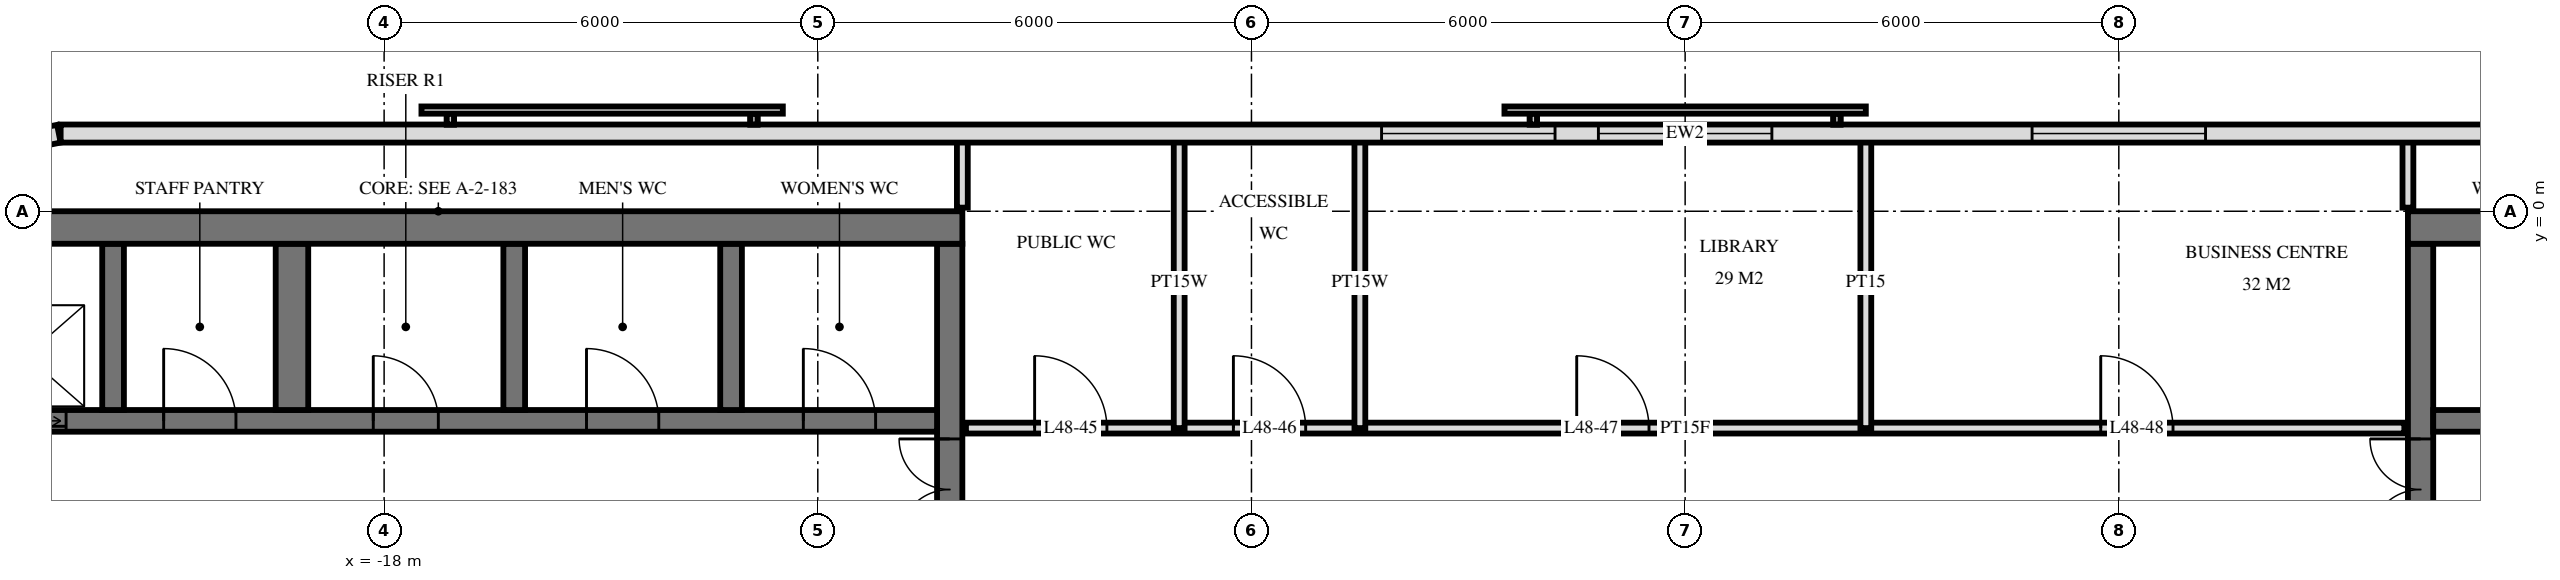
"""IFC4 building model, lengths in metres.
Left out: names, types, materials, properties, quantities, classifications, styles, units other than length and angle.
Written with IfcOpenShell. Run it as: python <this file> out.ifc"""

import sys

from ifc_helpers import new_model, si_unit, direction, frame, frame_2d, origin, place, context, subcontext, project, spatial, rectangle, extrude, element, fill, save


model = new_model("IFC4")
c1 = context("Model", 3, precision=1e-05, world=origin(), true_north=direction((0.0, 1.0)))
c2 = subcontext(c1, "Body", "Model", "MODEL_VIEW")
j1 = project(units=[si_unit("LENGTHUNIT", "METRE"), si_unit("PLANEANGLEUNIT", "RADIAN")], contexts=[c1])
p1 = place(None, origin())
s1 = spatial("IfcSite", under=j1, at=p1, CompositionType="ELEMENT")
p2 = place(p1, origin())
s2 = spatial("IfcBuilding", under=s1, at=p2, CompositionType="ELEMENT")
p3 = place(p2, frame((0.0, 0.0, 187.1)))
s3 = spatial("IfcBuildingStorey", under=s2, at=p3, CompositionType="ELEMENT", Elevation=187.1)
p4 = place(p3, frame((-24.5, -0.225, 0.0), z_axis=(0.0, 0.0, 1.0), x_axis=(1.0, 0.0, 0.0)))
e1 = element("IfcWall", 1, at=p4, inside=s3, PredefinedType="SHEAR", context=c2, shape_type="SweptSolid", body=[
    extrude(rectangle(XDim=14.5, YDim=0.45, at=frame_2d((7.25, 0.0))), origin(), (0.0, 0.0, 1.0), 3.5),
])
p5 = place(p3, frame((-10.175, -14.55, 0.0), z_axis=(0.0, 0.0, 1.0), x_axis=(0.0, 1.0, 0.0)))
e2 = element("IfcWall", 2, at=p5, inside=s3, PredefinedType="SHEAR", context=c2, shape_type="SweptSolid", body=[
    extrude(rectangle(XDim=14.1, YDim=0.35, at=frame_2d((7.05, 0.0))), origin(), (0.0, 0.0, 1.0), 3.5),
])
p6 = place(p5, frame((8.4, 0.0, 0.0)))
e3 = element("IfcOpeningElement", 3, at=p6, cuts=e2, PredefinedType="OPENING", context=c2, shape_type="SweptSolid", body=[
    extrude(rectangle(XDim=1.4, YDim=2.4, at=frame_2d((0.7, 1.2))), frame((0.0, 0.185, 0.0), z_axis=(0.0, -1.0, 0.0), x_axis=(1.0, 0.0, 0.0)), (0.0, 0.0, 1.0), 0.37),
])
p7 = place(p5, frame((10.0, 0.0, 0.0)))
e4 = element("IfcOpeningElement", 4, at=p7, cuts=e2, PredefinedType="OPENING", context=c2, shape_type="SweptSolid", body=[
    extrude(rectangle(XDim=1.4, YDim=2.4, at=frame_2d((0.7, 1.2))), frame((0.0, 0.185, 0.0), z_axis=(0.0, -1.0, 0.0), x_axis=(1.0, 0.0, 0.0)), (0.0, 0.0, 1.0), 0.37),
])
p8 = place(p5, frame((4.0, 0.0, 0.0)))
e5 = element("IfcOpeningElement", 5, at=p8, cuts=e2, PredefinedType="OPENING", context=c2, shape_type="SweptSolid", body=[
    extrude(rectangle(XDim=1.2, YDim=2.1, at=frame_2d((0.6, 1.05))), frame((0.0, 0.185, 0.0), z_axis=(0.0, -1.0, 0.0), x_axis=(1.0, 0.0, 0.0)), (0.0, 0.0, 1.0), 0.37),
])
p9 = place(p3, frame((-24.05, -2.9, 0.0), z_axis=(0.0, 0.0, 1.0), x_axis=(1.0, 0.0, 0.0)))
e6 = element("IfcWall", 6, at=p9, inside=s3, PredefinedType="SHEAR", context=c2, shape_type="SweptSolid", body=[
    extrude(rectangle(XDim=13.7, YDim=0.3, at=frame_2d((6.85, 0.0))), origin(), (0.0, 0.0, 1.0), 3.5),
])
p10 = place(p9, frame((0.55, 0.0, 0.0)))
e7 = element("IfcOpeningElement", 7, at=p10, cuts=e6, PredefinedType="OPENING", context=c2, shape_type="SweptSolid", body=[
    extrude(rectangle(XDim=1.1, YDim=2.1, at=frame_2d((0.55, 1.05))), frame((0.0, 0.16, 0.0), z_axis=(0.0, -1.0, 0.0), x_axis=(1.0, 0.0, 0.0)), (0.0, 0.0, 1.0), 0.32),
])
p11 = place(p9, frame((5.9, 0.0, 0.0)))
e8 = element("IfcOpeningElement", 8, at=p11, cuts=e6, PredefinedType="OPENING", context=c2, shape_type="SweptSolid", body=[
    extrude(rectangle(XDim=0.9, YDim=2.1, at=frame_2d((0.45, 1.05))), frame((0.0, 0.16, 0.0), z_axis=(0.0, -1.0, 0.0), x_axis=(1.0, 0.0, 0.0)), (0.0, 0.0, 1.0), 0.32),
])
p12 = place(p9, frame((11.85, 0.0, 0.0)))
e9 = element("IfcOpeningElement", 9, at=p12, cuts=e6, PredefinedType="OPENING", context=c2, shape_type="SweptSolid", body=[
    extrude(rectangle(XDim=1.0, YDim=2.1, at=frame_2d((0.5, 1.05))), frame((0.0, 0.16, 0.0), z_axis=(0.0, -1.0, 0.0), x_axis=(1.0, 0.0, 0.0)), (0.0, 0.0, 1.0), 0.32),
])
p13 = place(p9, frame((8.85, 0.0, 0.0)))
e10 = element("IfcOpeningElement", 10, at=p13, cuts=e6, PredefinedType="OPENING", context=c2, shape_type="SweptSolid", body=[
    extrude(rectangle(XDim=1.0, YDim=2.1, at=frame_2d((0.5, 1.05))), frame((0.0, 0.16, 0.0), z_axis=(0.0, -1.0, 0.0), x_axis=(1.0, 0.0, 0.0)), (0.0, 0.0, 1.0), 0.32),
])
p14 = place(p9, frame((3.0, 0.0, 0.0)))
e11 = element("IfcOpeningElement", 11, at=p14, cuts=e6, PredefinedType="OPENING", context=c2, shape_type="SweptSolid", body=[
    extrude(rectangle(XDim=1.0, YDim=2.1, at=frame_2d((0.5, 1.05))), frame((0.0, 0.16, 0.0), z_axis=(0.0, -1.0, 0.0), x_axis=(1.0, 0.0, 0.0)), (0.0, 0.0, 1.0), 0.32),
])
for number, where, z_axis, x_axis in (
    (12, (-13.2, -2.75, 0.0), (0.0, 0.0, 1.0), (0.0, 1.0, 0.0)),
    (13, (-16.2, -2.75, 0.0), (0.0, 0.0, 1.0), (0.0, 1.0, 0.0)),
):
    element("IfcWall", number, at=place(p3, frame(where, z_axis=z_axis, x_axis=x_axis)), inside=s3, PredefinedType="SHEAR", context=c2, shape_type="SweptSolid", body=[
        extrude(rectangle(XDim=2.3, YDim=0.3, at=frame_2d((1.15, 0.0))), origin(), (0.0, 0.0, 1.0), 3.5),
    ])
p15 = place(p3, frame((-19.275, -2.75, 0.0), z_axis=(0.0, 0.0, 1.0), x_axis=(0.0, 1.0, 0.0)))
e14 = element("IfcWall", 14, at=p15, inside=s3, PredefinedType="SHEAR", context=c2, shape_type="SweptSolid", body=[
    extrude(rectangle(XDim=2.3, YDim=0.45, at=frame_2d((1.15, 0.0))), origin(), (0.0, 0.0, 1.0), 3.5),
])
p16 = place(p3, frame((-21.75, -2.75, 0.0), z_axis=(0.0, 0.0, 1.0), x_axis=(0.0, 1.0, 0.0)))
e15 = element("IfcWall", 15, at=p16, inside=s3, PredefinedType="SHEAR", context=c2, shape_type="SweptSolid", body=[
    extrude(rectangle(XDim=2.3, YDim=0.3, at=frame_2d((1.15, 0.0))), origin(), (0.0, 0.0, 1.0), 3.5),
])
p17 = place(p3, frame((10.0, -0.225, 0.0), z_axis=(0.0, 0.0, 1.0), x_axis=(1.0, 0.0, 0.0)))
e16 = element("IfcWall", 16, at=p17, inside=s3, PredefinedType="SHEAR", context=c2, shape_type="SweptSolid", body=[
    extrude(rectangle(XDim=14.5, YDim=0.45, at=frame_2d((7.25, 0.0))), origin(), (0.0, 0.0, 1.0), 3.5),
])
p18 = place(p3, frame((10.175, -14.55, 0.0), z_axis=(0.0, 0.0, 1.0), x_axis=(0.0, 1.0, 0.0)))
e17 = element("IfcWall", 17, at=p18, inside=s3, PredefinedType="SHEAR", context=c2, shape_type="SweptSolid", body=[
    extrude(rectangle(XDim=14.1, YDim=0.35, at=frame_2d((7.05, 0.0))), origin(), (0.0, 0.0, 1.0), 3.5),
])
p19 = place(p18, frame((8.4, 0.0, 0.0)))
e18 = element("IfcOpeningElement", 18, at=p19, cuts=e17, PredefinedType="OPENING", context=c2, shape_type="SweptSolid", body=[
    extrude(rectangle(XDim=1.4, YDim=2.4, at=frame_2d((0.7, 1.2))), frame((0.0, 0.185, 0.0), z_axis=(0.0, -1.0, 0.0), x_axis=(1.0, 0.0, 0.0)), (0.0, 0.0, 1.0), 0.37),
])
p20 = place(p18, frame((10.0, 0.0, 0.0)))
e19 = element("IfcOpeningElement", 19, at=p20, cuts=e17, PredefinedType="OPENING", context=c2, shape_type="SweptSolid", body=[
    extrude(rectangle(XDim=1.4, YDim=2.4, at=frame_2d((0.7, 1.2))), frame((0.0, 0.185, 0.0), z_axis=(0.0, -1.0, 0.0), x_axis=(1.0, 0.0, 0.0)), (0.0, 0.0, 1.0), 0.37),
])
p21 = place(p18, frame((4.0, 0.0, 0.0)))
e20 = element("IfcOpeningElement", 20, at=p21, cuts=e17, PredefinedType="OPENING", context=c2, shape_type="SweptSolid", body=[
    extrude(rectangle(XDim=1.2, YDim=2.1, at=frame_2d((0.6, 1.05))), frame((0.0, 0.185, 0.0), z_axis=(0.0, -1.0, 0.0), x_axis=(1.0, 0.0, 0.0)), (0.0, 0.0, 1.0), 0.37),
])
p22 = place(p3, frame((10.35, -2.9, 0.0), z_axis=(0.0, 0.0, 1.0), x_axis=(1.0, 0.0, 0.0)))
e21 = element("IfcWall", 21, at=p22, inside=s3, PredefinedType="SHEAR", context=c2, shape_type="SweptSolid", body=[
    extrude(rectangle(XDim=13.7, YDim=0.3, at=frame_2d((6.85, 0.0))), origin(), (0.0, 0.0, 1.0), 3.5),
])
p23 = place(p22, frame((12.05, 0.0, 0.0)))
e22 = element("IfcOpeningElement", 22, at=p23, cuts=e21, PredefinedType="OPENING", context=c2, shape_type="SweptSolid", body=[
    extrude(rectangle(XDim=1.1, YDim=2.1, at=frame_2d((0.55, 1.05))), frame((0.0, 0.16, 0.0), z_axis=(0.0, -1.0, 0.0), x_axis=(1.0, 0.0, 0.0)), (0.0, 0.0, 1.0), 0.32),
])
p24 = place(p22, frame((6.9, 0.0, 0.0)))
e23 = element("IfcOpeningElement", 23, at=p24, cuts=e21, PredefinedType="OPENING", context=c2, shape_type="SweptSolid", body=[
    extrude(rectangle(XDim=0.9, YDim=2.1, at=frame_2d((0.45, 1.05))), frame((0.0, 0.16, 0.0), z_axis=(0.0, -1.0, 0.0), x_axis=(1.0, 0.0, 0.0)), (0.0, 0.0, 1.0), 0.32),
])
p25 = place(p22, frame((0.85, 0.0, 0.0)))
e24 = element("IfcOpeningElement", 24, at=p25, cuts=e21, PredefinedType="OPENING", context=c2, shape_type="SweptSolid", body=[
    extrude(rectangle(XDim=1.0, YDim=2.1, at=frame_2d((0.5, 1.05))), frame((0.0, 0.16, 0.0), z_axis=(0.0, -1.0, 0.0), x_axis=(1.0, 0.0, 0.0)), (0.0, 0.0, 1.0), 0.32),
])
p26 = place(p22, frame((3.85, 0.0, 0.0)))
e25 = element("IfcOpeningElement", 25, at=p26, cuts=e21, PredefinedType="OPENING", context=c2, shape_type="SweptSolid", body=[
    extrude(rectangle(XDim=1.0, YDim=2.1, at=frame_2d((0.5, 1.05))), frame((0.0, 0.16, 0.0), z_axis=(0.0, -1.0, 0.0), x_axis=(1.0, 0.0, 0.0)), (0.0, 0.0, 1.0), 0.32),
])
p27 = place(p22, frame((9.7, 0.0, 0.0)))
e26 = element("IfcOpeningElement", 26, at=p27, cuts=e21, PredefinedType="OPENING", context=c2, shape_type="SweptSolid", body=[
    extrude(rectangle(XDim=1.0, YDim=2.1, at=frame_2d((0.5, 1.05))), frame((0.0, 0.16, 0.0), z_axis=(0.0, -1.0, 0.0), x_axis=(1.0, 0.0, 0.0)), (0.0, 0.0, 1.0), 0.32),
])
p28 = place(p3, frame((22.475, 1.075, 0.0), z_axis=(0.0, 0.0, 1.0), x_axis=(-1.0, 0.0, 0.0)))
e27 = element("IfcWall", 27, at=p28, inside=s3, PredefinedType="SOLIDWALL", context=c2, shape_type="SweptSolid", body=[
    extrude(rectangle(XDim=44.951, YDim=0.25, at=frame_2d((22.475, 0.0))), origin(), (0.0, 0.0, 1.0), 3.22),
])
p29 = place(p28, frame((15.275, 0.0, 0.9)))
e28 = element("IfcOpeningElement", 28, at=p29, cuts=e27, PredefinedType="OPENING", context=c2, shape_type="SweptSolid", body=[
    extrude(rectangle(XDim=2.4, YDim=1.5, at=frame_2d((1.2, 0.75))), frame((0.0, 0.135, 0.0), z_axis=(0.0, -1.0, 0.0), x_axis=(1.0, 0.0, 0.0)), (0.0, 0.0, 1.0), 0.27),
])
p30 = place(p28, frame((21.275, 0.0, 0.9)))
e29 = element("IfcOpeningElement", 29, at=p30, cuts=e27, PredefinedType="OPENING", context=c2, shape_type="SweptSolid", body=[
    extrude(rectangle(XDim=2.4, YDim=1.5, at=frame_2d((1.2, 0.75))), frame((0.0, 0.135, 0.0), z_axis=(0.0, -1.0, 0.0), x_axis=(1.0, 0.0, 0.0)), (0.0, 0.0, 1.0), 0.27),
])
p31 = place(p28, frame((24.275, 0.0, 0.9)))
e30 = element("IfcOpeningElement", 30, at=p31, cuts=e27, PredefinedType="OPENING", context=c2, shape_type="SweptSolid", body=[
    extrude(rectangle(XDim=2.4, YDim=1.5, at=frame_2d((1.2, 0.75))), frame((0.0, 0.135, 0.0), z_axis=(0.0, -1.0, 0.0), x_axis=(1.0, 0.0, 0.0)), (0.0, 0.0, 1.0), 0.27),
])
p32 = place(p3, frame((-22.5, 1.073, 0.0), z_axis=(0.0, 0.0, 1.0), x_axis=(-0.980803419081, -0.194999110559, 0.0)))
e31 = element("IfcWall", 31, at=p32, inside=s3, PredefinedType="SOLIDWALL", context=c2, shape_type="SweptSolid", body=[
    extrude(rectangle(XDim=1.681, YDim=0.25, at=frame_2d((0.841, 0.0))), origin(), (0.0, 0.0, 1.0), 3.22),
])
p33 = place(p3, frame((10.0, 0.05, 0.0), z_axis=(0.0, 0.0, 1.0), x_axis=(0.0, 1.0, 0.0)))
e32 = element("IfcWall", 32, at=p33, inside=s3, PredefinedType="PARTITIONING", context=c2, shape_type="SweptSolid", body=[
    extrude(rectangle(XDim=0.97, YDim=0.15, at=frame_2d((0.485, 0.0))), origin(), (0.0, 0.0, 1.0), 3.22),
])
p34 = place(p3, frame((2.5, -3.0, 0.0), z_axis=(0.0, 0.0, 1.0), x_axis=(0.0, 1.0, 0.0)))
e33 = element("IfcWall", 33, at=p34, inside=s3, PredefinedType="PARTITIONING", context=c2, shape_type="SweptSolid", body=[
    extrude(rectangle(XDim=4.02, YDim=0.15, at=frame_2d((2.01, 0.0))), origin(), (0.0, 0.0, 1.0), 3.22),
])
for number, where, z_axis, x_axis in (
    (34, (-4.5, -3.0, 0.0), (0.0, 0.0, 1.0), (0.0, 1.0, 0.0)),
    (35, (-7.0, -3.0, 0.0), (0.0, 0.0, 1.0), (0.0, 1.0, 0.0)),
):
    element("IfcWall", number, at=place(p3, frame(where, z_axis=z_axis, x_axis=x_axis)), inside=s3, PredefinedType="PLUMBINGWALL", context=c2, shape_type="SweptSolid", body=[
        extrude(rectangle(XDim=4.02, YDim=0.15, at=frame_2d((2.01, 0.0))), origin(), (0.0, 0.0, 1.0), 3.22),
    ])
p35 = place(p3, frame((-10.0, 0.05, 0.0), z_axis=(0.0, 0.0, 1.0), x_axis=(0.0, 1.0, 0.0)))
e36 = element("IfcWall", 36, at=p35, inside=s3, PredefinedType="PLUMBINGWALL", context=c2, shape_type="SweptSolid", body=[
    extrude(rectangle(XDim=0.97, YDim=0.15, at=frame_2d((0.485, 0.0))), origin(), (0.0, 0.0, 1.0), 3.22),
])
p36 = place(p3, frame((-9.95, -3.0, 0.0), z_axis=(0.0, 0.0, 1.0), x_axis=(1.0, 0.0, 0.0)))
e37 = element("IfcWall", 37, at=p36, inside=s3, PredefinedType="PARTITIONING", context=c2, shape_type="SweptSolid", body=[
    extrude(rectangle(XDim=19.9, YDim=0.15, at=frame_2d((9.95, 0.0))), origin(), (0.0, 0.0, 1.0), 3.22),
])
p37 = place(p36, frame((0.95, 0.0, 0.0)))
e38 = element("IfcOpeningElement", 38, at=p37, cuts=e37, PredefinedType="OPENING", context=c2, shape_type="SweptSolid", body=[
    extrude(rectangle(XDim=1.0, YDim=2.1, at=frame_2d((0.5, 1.05))), frame((0.0, 0.085, 0.0), z_axis=(0.0, -1.0, 0.0), x_axis=(1.0, 0.0, 0.0)), (0.0, 0.0, 1.0), 0.17),
])
p38 = place(p36, frame((3.7, 0.0, 0.0)))
e39 = element("IfcOpeningElement", 39, at=p38, cuts=e37, PredefinedType="OPENING", context=c2, shape_type="SweptSolid", body=[
    extrude(rectangle(XDim=1.0, YDim=2.1, at=frame_2d((0.5, 1.05))), frame((0.0, 0.085, 0.0), z_axis=(0.0, -1.0, 0.0), x_axis=(1.0, 0.0, 0.0)), (0.0, 0.0, 1.0), 0.17),
])
p39 = place(p36, frame((8.45, 0.0, 0.0)))
e40 = element("IfcOpeningElement", 40, at=p39, cuts=e37, PredefinedType="OPENING", context=c2, shape_type="SweptSolid", body=[
    extrude(rectangle(XDim=1.0, YDim=2.1, at=frame_2d((0.5, 1.05))), frame((0.0, 0.085, 0.0), z_axis=(0.0, -1.0, 0.0), x_axis=(1.0, 0.0, 0.0)), (0.0, 0.0, 1.0), 0.17),
])
p40 = place(p36, frame((15.7, 0.0, 0.0)))
e41 = element("IfcOpeningElement", 41, at=p40, cuts=e37, PredefinedType="OPENING", context=c2, shape_type="SweptSolid", body=[
    extrude(rectangle(XDim=1.0, YDim=2.1, at=frame_2d((0.5, 1.05))), frame((0.0, 0.085, 0.0), z_axis=(0.0, -1.0, 0.0), x_axis=(1.0, 0.0, 0.0)), (0.0, 0.0, 1.0), 0.17),
])
p41 = place(p29, origin())
e42 = element("IfcWindow", 42, at=p41, inside=s3, PartitioningType="SINGLE_PANEL", PredefinedType="WINDOW", context=c2, shape_type="SweptSolid", body=[
    extrude(rectangle(XDim=2.4, YDim=1.5, at=frame_2d((1.2, 0.75))), frame((0.0, 0.03, 0.0), z_axis=(0.0, -1.0, 0.0), x_axis=(1.0, 0.0, 0.0)), (0.0, 0.0, 1.0), 0.06),
])
fill(e28, e42)
p42 = place(p30, origin())
e43 = element("IfcWindow", 43, at=p42, inside=s3, PartitioningType="SINGLE_PANEL", PredefinedType="WINDOW", context=c2, shape_type="SweptSolid", body=[
    extrude(rectangle(XDim=2.4, YDim=1.5, at=frame_2d((1.2, 0.75))), frame((0.0, 0.03, 0.0), z_axis=(0.0, -1.0, 0.0), x_axis=(1.0, 0.0, 0.0)), (0.0, 0.0, 1.0), 0.06),
])
fill(e29, e43)
p43 = place(p31, origin())
e44 = element("IfcWindow", 44, at=p43, inside=s3, PartitioningType="SINGLE_PANEL", PredefinedType="WINDOW", context=c2, shape_type="SweptSolid", body=[
    extrude(rectangle(XDim=2.4, YDim=1.5, at=frame_2d((1.2, 0.75))), frame((0.0, 0.03, 0.0), z_axis=(0.0, -1.0, 0.0), x_axis=(1.0, 0.0, 0.0)), (0.0, 0.0, 1.0), 0.06),
])
fill(e30, e44)
p44 = place(p10, origin())
e45 = element("IfcDoor", 45, at=p44, inside=s3, OperationType="DOUBLE_DOOR_SLIDING", PredefinedType="USERDEFINED", context=c2, shape_type="SweptSolid", body=[
    extrude(rectangle(XDim=1.1, YDim=2.1, at=frame_2d((0.55, 1.05))), frame((0.0, 0.025, 0.0), z_axis=(0.0, -1.0, 0.0), x_axis=(1.0, 0.0, 0.0)), (0.0, 0.0, 1.0), 0.05),
])
fill(e7, e45)
p45 = place(p7, origin())
e46 = element("IfcDoor", 46, at=p45, inside=s3, OperationType="DOUBLE_DOOR_SINGLE_SWING", PredefinedType="DOOR", context=c2, shape_type="SweptSolid", body=[
    extrude(rectangle(XDim=1.4, YDim=2.4, at=frame_2d((0.7, 1.2))), frame((0.0, 0.025, 0.0), z_axis=(0.0, -1.0, 0.0), x_axis=(1.0, 0.0, 0.0)), (0.0, 0.0, 1.0), 0.05),
])
fill(e4, e46)
p46 = place(p11, origin())
e47 = element("IfcDoor", 47, at=p46, inside=s3, OperationType="SINGLE_SWING_RIGHT", PredefinedType="DOOR", context=c2, shape_type="SweptSolid", body=[
    extrude(rectangle(XDim=0.9, YDim=2.1, at=frame_2d((0.45, 1.05))), frame((0.0, 0.025, 0.0), z_axis=(0.0, -1.0, 0.0), x_axis=(1.0, 0.0, 0.0)), (0.0, 0.0, 1.0), 0.05),
])
fill(e8, e47)
p47 = place(p12, origin())
e48 = element("IfcDoor", 48, at=p47, inside=s3, OperationType="SINGLE_SWING_RIGHT", PredefinedType="DOOR", context=c2, shape_type="SweptSolid", body=[
    extrude(rectangle(XDim=1.0, YDim=2.1, at=frame_2d((0.5, 1.05))), frame((0.0, 0.025, 0.0), z_axis=(0.0, -1.0, 0.0), x_axis=(1.0, 0.0, 0.0)), (0.0, 0.0, 1.0), 0.05),
])
fill(e9, e48)
p48 = place(p13, origin())
e49 = element("IfcDoor", 49, at=p48, inside=s3, OperationType="SINGLE_SWING_RIGHT", PredefinedType="DOOR", context=c2, shape_type="SweptSolid", body=[
    extrude(rectangle(XDim=1.0, YDim=2.1, at=frame_2d((0.5, 1.05))), frame((0.0, 0.025, 0.0), z_axis=(0.0, -1.0, 0.0), x_axis=(1.0, 0.0, 0.0)), (0.0, 0.0, 1.0), 0.05),
])
fill(e10, e49)
p49 = place(p14, origin())
e50 = element("IfcDoor", 50, at=p49, inside=s3, OperationType="SINGLE_SWING_RIGHT", PredefinedType="DOOR", context=c2, shape_type="SweptSolid", body=[
    extrude(rectangle(XDim=1.0, YDim=2.1, at=frame_2d((0.5, 1.05))), frame((0.0, 0.025, 0.0), z_axis=(0.0, -1.0, 0.0), x_axis=(1.0, 0.0, 0.0)), (0.0, 0.0, 1.0), 0.05),
])
fill(e11, e50)
p50 = place(p20, origin())
e51 = element("IfcDoor", 51, at=p50, inside=s3, OperationType="DOUBLE_DOOR_SINGLE_SWING", PredefinedType="DOOR", context=c2, shape_type="SweptSolid", body=[
    extrude(rectangle(XDim=1.4, YDim=2.4, at=frame_2d((0.7, 1.2))), frame((0.0, 0.025, 0.0), z_axis=(0.0, -1.0, 0.0), x_axis=(1.0, 0.0, 0.0)), (0.0, 0.0, 1.0), 0.05),
])
fill(e19, e51)
p51 = place(p37, origin())
e52 = element("IfcDoor", 52, at=p51, inside=s3, OperationType="SINGLE_SWING_RIGHT", PredefinedType="DOOR", context=c2, shape_type="SweptSolid", body=[
    extrude(rectangle(XDim=1.0, YDim=2.1, at=frame_2d((0.5, 1.05))), frame((0.0, 0.025, 0.0), z_axis=(0.0, -1.0, 0.0), x_axis=(1.0, 0.0, 0.0)), (0.0, 0.0, 1.0), 0.05),
])
fill(e38, e52)
p52 = place(p38, origin())
e53 = element("IfcDoor", 53, at=p52, inside=s3, OperationType="SINGLE_SWING_RIGHT", PredefinedType="DOOR", context=c2, shape_type="SweptSolid", body=[
    extrude(rectangle(XDim=1.0, YDim=2.1, at=frame_2d((0.5, 1.05))), frame((0.0, 0.025, 0.0), z_axis=(0.0, -1.0, 0.0), x_axis=(1.0, 0.0, 0.0)), (0.0, 0.0, 1.0), 0.05),
])
fill(e39, e53)
p53 = place(p39, origin())
e54 = element("IfcDoor", 54, at=p53, inside=s3, OperationType="SINGLE_SWING_RIGHT", PredefinedType="DOOR", context=c2, shape_type="SweptSolid", body=[
    extrude(rectangle(XDim=1.0, YDim=2.1, at=frame_2d((0.5, 1.05))), frame((0.0, 0.025, 0.0), z_axis=(0.0, -1.0, 0.0), x_axis=(1.0, 0.0, 0.0)), (0.0, 0.0, 1.0), 0.05),
])
fill(e40, e54)
p54 = place(p40, origin())
e55 = element("IfcDoor", 55, at=p54, inside=s3, OperationType="SINGLE_SWING_RIGHT", PredefinedType="DOOR", context=c2, shape_type="SweptSolid", body=[
    extrude(rectangle(XDim=1.0, YDim=2.1, at=frame_2d((0.5, 1.05))), frame((0.0, 0.025, 0.0), z_axis=(0.0, -1.0, 0.0), x_axis=(1.0, 0.0, 0.0)), (0.0, 0.0, 1.0), 0.05),
])
fill(e41, e55)
save(model, sys.argv[1])
